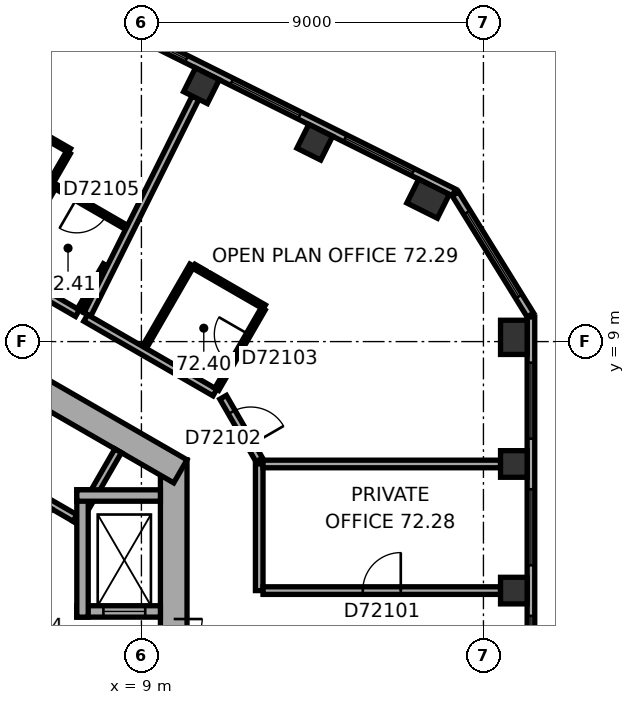
"""IFC4 building model, lengths in metres.
Left out: names, types, materials, properties, quantities, classifications, styles, units other than length and angle.
Written with IfcOpenShell. Run it as: python <this file> out.ifc"""

import sys

from ifc_helpers import new_model, si_unit, direction, frame, frame_2d, origin, origin_2d, place, context, subcontext, project, spatial, rectangle, extrude, element, fill, save


model = new_model("IFC4")
c1 = context("Model", 3, precision=1e-05, world=origin(), true_north=direction((0.0, 1.0)))
c2 = subcontext(c1, "Body", "Model", "MODEL_VIEW")
j1 = project(units=[si_unit("LENGTHUNIT", "METRE"), si_unit("PLANEANGLEUNIT", "RADIAN")], contexts=[c1])
p1 = place(None, origin())
s1 = spatial("IfcSite", under=j1, at=p1, CompositionType="ELEMENT")
p2 = place(p1, origin())
s2 = spatial("IfcBuilding", under=s1, at=p2, CompositionType="ELEMENT")
p3 = place(p2, frame((0.0, 0.0, 293.1)))
s3 = spatial("IfcBuildingStorey", under=s2, at=p3, CompositionType="ELEMENT", Elevation=293.1)
for number, where, z_axis, x_axis in (
    (1, (18.8, 2.448, 0.0), (0.0, 0.0, 1.0), (0.0, 1.0, 0.0)),
    (2, (18.8, 5.78, 0.0), (0.0, 0.0, 1.0), (0.0, 1.0, 0.0)),
):
    element("IfcColumn", number, at=place(p3, frame(where, z_axis=z_axis, x_axis=x_axis)), inside=s3, PredefinedType="COLUMN", context=c2, shape_type="SweptSolid", body=[
        extrude(rectangle(XDim=0.7, YDim=0.7, at=origin_2d()), origin(), (0.0, 0.0, 1.0), 3.7),
    ])
for number, where, z_axis, x_axis in (
    (3, (18.8, 9.112, 0.0), (0.0, 0.0, 1.0), (0.0, 1.0, 0.0)),
    (4, (16.543, 12.759, 0.0), (0.0, 0.0, 1.0), (-0.895, 0.446, 0.0)),
):
    element("IfcColumn", number, at=place(p3, frame(where, z_axis=z_axis, x_axis=x_axis)), inside=s3, PredefinedType="COLUMN", context=c2, shape_type="SweptSolid", body=[
        extrude(rectangle(XDim=0.9, YDim=0.7, at=origin_2d()), origin(), (0.0, 0.0, 1.0), 3.7),
    ])
for number, where, z_axis, x_axis in (
    (5, (13.561, 14.246, 0.0), (0.0, 0.0, 1.0), (-0.895, 0.446, 0.0)),
    (6, (10.58, 15.732, 0.0), (0.0, 0.0, 1.0), (-0.895, 0.446, 0.0)),
):
    element("IfcColumn", number, at=place(p3, frame(where, z_axis=z_axis, x_axis=x_axis)), inside=s3, PredefinedType="COLUMN", context=c2, shape_type="SweptSolid", body=[
        extrude(rectangle(XDim=0.7, YDim=0.7, at=origin_2d()), origin(), (0.0, 0.0, 1.0), 3.7),
    ])
p4 = place(p3, frame((9.85, -5.889, 0.0), z_axis=(0.0, 0.0, 1.0), x_axis=(0.0, 1.0, 0.0)))
e7 = element("IfcWall", 7, at=p4, inside=s3, PredefinedType="SHEAR", context=c2, shape_type="SweptSolid", body=[
    extrude(rectangle(XDim=11.778, YDim=0.7, at=frame_2d((5.889, 0.0))), origin(), (0.0, 0.0, 1.0), 3.7),
])
p5 = place(p4, frame((6.089, 0.0, 0.0)))
e8 = element("IfcOpeningElement", 8, at=p5, cuts=e7, PredefinedType="OPENING", context=c2, shape_type="SweptSolid", body=[
    extrude(rectangle(XDim=1.5, YDim=2.1, at=frame_2d((0.75, 1.05))), frame((0.0, 0.36, 0.0), z_axis=(0.0, -1.0, 0.0), x_axis=(1.0, 0.0, 0.0)), (0.0, 0.0, 1.0), 0.72),
])
p6 = place(p4, frame((2.939, 0.0, 0.0)))
e9 = element("IfcOpeningElement", 9, at=p6, cuts=e7, PredefinedType="OPENING", context=c2, shape_type="SweptSolid", body=[
    extrude(rectangle(XDim=0.9, YDim=2.1, at=frame_2d((0.45, 1.05))), frame((0.0, 0.36, 0.0), z_axis=(0.0, -1.0, 0.0), x_axis=(1.0, 0.0, 0.0)), (0.0, 0.0, 1.0), 0.72),
])
p7 = place(p3, frame((10.025, 5.586, 0.0), z_axis=(0.0, 0.0, 1.0), x_axis=(-0.866026453023, 0.499998182661, 0.0)))
e10 = element("IfcWall", 10, at=p7, inside=s3, PredefinedType="SHEAR", context=c2, shape_type="SweptSolid", body=[
    extrude(rectangle(XDim=11.778, YDim=0.7, at=frame_2d((5.889, 0.0))), origin(), (0.0, 0.0, 1.0), 3.7),
])
p8 = place(p7, frame((5.139, 0.0, 0.0)))
e11 = element("IfcOpeningElement", 11, at=p8, cuts=e10, PredefinedType="OPENING", context=c2, shape_type="SweptSolid", body=[
    extrude(rectangle(XDim=0.9, YDim=2.1, at=frame_2d((0.45, 1.05))), frame((0.0, 0.36, 0.0), z_axis=(0.0, -1.0, 0.0), x_axis=(1.0, 0.0, 0.0)), (0.0, 0.0, 1.0), 0.72),
])
p9 = place(p3, frame((19.25, -8.084, 0.0), z_axis=(0.0, 0.0, 1.0), x_axis=(0.0, 1.0, 0.0)))
e12 = element("IfcWall", 12, at=p9, inside=s3, PredefinedType="STANDARD", context=c2, shape_type="SweptSolid", body=[
    extrude(rectangle(XDim=17.731, YDim=0.2, at=frame_2d((8.866, 0.0))), origin(), (0.0, 0.0, 1.0), 3.7),
])
p10 = place(p9, frame((1.203, 0.0, 0.9)))
e13 = element("IfcOpeningElement", 13, at=p10, cuts=e12, PredefinedType="OPENING", context=c2, shape_type="SweptSolid", body=[
    extrude(rectangle(XDim=2.0, YDim=2.0, at=frame_2d((1.0, 1.0))), frame((0.0, 0.11, 0.0), z_axis=(0.0, -1.0, 0.0), x_axis=(1.0, 0.0, 0.0)), (0.0, 0.0, 1.0), 0.22),
])
p11 = place(p9, frame((4.535, 0.0, 0.9)))
e14 = element("IfcOpeningElement", 14, at=p11, cuts=e12, PredefinedType="OPENING", context=c2, shape_type="SweptSolid", body=[
    extrude(rectangle(XDim=2.0, YDim=2.0, at=frame_2d((1.0, 1.0))), frame((0.0, 0.11, 0.0), z_axis=(0.0, -1.0, 0.0), x_axis=(1.0, 0.0, 0.0)), (0.0, 0.0, 1.0), 0.22),
])
p12 = place(p9, frame((7.866, 0.0, 0.9)))
e15 = element("IfcOpeningElement", 15, at=p12, cuts=e12, PredefinedType="OPENING", context=c2, shape_type="SweptSolid", body=[
    extrude(rectangle(XDim=2.0, YDim=2.0, at=frame_2d((1.0, 1.0))), frame((0.0, 0.11, 0.0), z_axis=(0.0, -1.0, 0.0), x_axis=(1.0, 0.0, 0.0)), (0.0, 0.0, 1.0), 0.22),
])
p13 = place(p9, frame((11.198, 0.0, 0.9)))
e16 = element("IfcOpeningElement", 16, at=p13, cuts=e12, PredefinedType="OPENING", context=c2, shape_type="SweptSolid", body=[
    extrude(rectangle(XDim=2.0, YDim=2.0, at=frame_2d((1.0, 1.0))), frame((0.0, 0.11, 0.0), z_axis=(0.0, -1.0, 0.0), x_axis=(1.0, 0.0, 0.0)), (0.0, 0.0, 1.0), 0.22),
])
p14 = place(p9, frame((14.53, 0.0, 0.9)))
e17 = element("IfcOpeningElement", 17, at=p14, cuts=e12, PredefinedType="OPENING", context=c2, shape_type="SweptSolid", body=[
    extrude(rectangle(XDim=2.0, YDim=2.0, at=frame_2d((1.0, 1.0))), frame((0.0, 0.11, 0.0), z_axis=(0.0, -1.0, 0.0), x_axis=(1.0, 0.0, 0.0)), (0.0, 0.0, 1.0), 0.22),
])
p15 = place(p3, frame((19.235, 9.7, 0.0), z_axis=(0.0, 0.0, 1.0), x_axis=(-0.526233475464, 0.850340125656, 0.0)))
e18 = element("IfcWall", 18, at=p15, inside=s3, PredefinedType="STANDARD", context=c2, shape_type="SweptSolid", body=[
    extrude(rectangle(XDim=3.747, YDim=0.2, at=frame_2d((1.874, 0.0))), origin(), (0.0, 0.0, 1.0), 3.7),
])
p16 = place(p15, frame((0.573, 0.0, 0.9)))
e19 = element("IfcOpeningElement", 19, at=p16, cuts=e18, PredefinedType="OPENING", context=c2, shape_type="SweptSolid", body=[
    extrude(rectangle(XDim=2.6, YDim=2.0, at=frame_2d((1.3, 1.0))), frame((0.0, 0.11, 0.0), z_axis=(0.0, -1.0, 0.0), x_axis=(1.0, 0.0, 0.0)), (0.0, 0.0, 1.0), 0.22),
])
p17 = place(p3, frame((17.223, 12.923, 0.0), z_axis=(0.0, 0.0, 1.0), x_axis=(-0.894930561148, 0.44620543556, 0.0)))
e20 = element("IfcWall", 20, at=p17, inside=s3, PredefinedType="STANDARD", context=c2, shape_type="SweptSolid", body=[
    extrude(rectangle(XDim=17.731, YDim=0.2, at=frame_2d((8.866, 0.0))), origin(), (0.0, 0.0, 1.0), 3.7),
])
p18 = place(p17, frame((1.202, 0.0, 0.9)))
e21 = element("IfcOpeningElement", 21, at=p18, cuts=e20, PredefinedType="OPENING", context=c2, shape_type="SweptSolid", body=[
    extrude(rectangle(XDim=2.0, YDim=2.0, at=frame_2d((1.0, 1.0))), frame((0.0, 0.11, 0.0), z_axis=(0.0, -1.0, 0.0), x_axis=(1.0, 0.0, 0.0)), (0.0, 0.0, 1.0), 0.22),
])
p19 = place(p17, frame((4.533, 0.0, 0.9)))
e22 = element("IfcOpeningElement", 22, at=p19, cuts=e20, PredefinedType="OPENING", context=c2, shape_type="SweptSolid", body=[
    extrude(rectangle(XDim=2.0, YDim=2.0, at=frame_2d((1.0, 1.0))), frame((0.0, 0.11, 0.0), z_axis=(0.0, -1.0, 0.0), x_axis=(1.0, 0.0, 0.0)), (0.0, 0.0, 1.0), 0.22),
])
p20 = place(p17, frame((7.865, 0.0, 0.9)))
e23 = element("IfcOpeningElement", 23, at=p20, cuts=e20, PredefinedType="OPENING", context=c2, shape_type="SweptSolid", body=[
    extrude(rectangle(XDim=2.0, YDim=2.0, at=frame_2d((1.0, 1.0))), frame((0.0, 0.11, 0.0), z_axis=(0.0, -1.0, 0.0), x_axis=(1.0, 0.0, 0.0)), (0.0, 0.0, 1.0), 0.22),
])
p21 = place(p17, frame((11.197, 0.0, 0.9)))
e24 = element("IfcOpeningElement", 24, at=p21, cuts=e20, PredefinedType="OPENING", context=c2, shape_type="SweptSolid", body=[
    extrude(rectangle(XDim=2.0, YDim=2.0, at=frame_2d((1.0, 1.0))), frame((0.0, 0.11, 0.0), z_axis=(0.0, -1.0, 0.0), x_axis=(1.0, 0.0, 0.0)), (0.0, 0.0, 1.0), 0.22),
])
p22 = place(p17, frame((14.528, 0.0, 0.9)))
e25 = element("IfcOpeningElement", 25, at=p22, cuts=e20, PredefinedType="OPENING", context=c2, shape_type="SweptSolid", body=[
    extrude(rectangle(XDim=2.0, YDim=2.0, at=frame_2d((1.0, 1.0))), frame((0.0, 0.11, 0.0), z_axis=(0.0, -1.0, 0.0), x_axis=(1.0, 0.0, 0.0)), (0.0, 0.0, 1.0), 0.22),
])
p23 = place(p3, frame((7.424, 4.259, 0.0), z_axis=(0.0, 0.0, 1.0), x_axis=(-0.866026010844, 0.49999894854, 0.0)))
e26 = element("IfcWall", 26, at=p23, inside=s3, PredefinedType="PARTITIONING", context=c2, shape_type="SweptSolid", body=[
    extrude(rectangle(XDim=8.0, YDim=0.2, at=frame_2d((4.0, 0.0))), origin(), (0.0, 0.0, 1.0), 3.42),
])
p24 = place(p3, frame((7.287, 4.222, 0.0), z_axis=(0.0, 0.0, 1.0), x_axis=(0.499946605688, 0.86605622881, 0.0)))
e27 = element("IfcWall", 27, at=p24, inside=s3, PredefinedType="PARTITIONING", context=c2, shape_type="SweptSolid", body=[
    extrude(rectangle(XDim=2.2, YDim=0.2, at=frame_2d((1.1, 0.0))), origin(), (0.0, 0.0, 1.0), 3.42),
])
p25 = place(p3, frame((7.3, 1.9, 0.0), z_axis=(0.0, 0.0, 1.0), x_axis=(1.0, 0.0, 0.0)))
e28 = element("IfcWall", 28, at=p25, inside=s3, PredefinedType="SHEAR", context=c2, shape_type="SweptSolid", body=[
    extrude(rectangle(XDim=2.2, YDim=0.3, at=frame_2d((1.1, 0.0))), origin(), (0.0, 0.0, 1.0), 3.42),
])
p26 = place(p25, frame((0.7, 0.0, 0.0)))
e29 = element("IfcOpeningElement", 29, at=p26, cuts=e28, PredefinedType="OPENING", context=c2, shape_type="SweptSolid", body=[
    extrude(rectangle(XDim=1.1, YDim=2.1, at=frame_2d((0.55, 1.05))), frame((0.0, 0.16, 0.0), z_axis=(0.0, -1.0, 0.0), x_axis=(1.0, 0.0, 0.0)), (0.0, 0.0, 1.0), 0.32),
])
p27 = place(p3, frame((7.45, 1.75, 0.0), z_axis=(0.0, 0.0, 1.0), x_axis=(0.0, 1.0, 0.0)))
e30 = element("IfcWall", 30, at=p27, inside=s3, PredefinedType="SHEAR", context=c2, shape_type="SweptSolid", body=[
    extrude(rectangle(XDim=3.35, YDim=0.3, at=frame_2d((1.675, 0.0))), origin(), (0.0, 0.0, 1.0), 3.42),
])
p28 = place(p3, frame((7.3, 4.95, 0.0), z_axis=(0.0, 0.0, 1.0), x_axis=(1.0, 0.0, 0.0)))
e31 = element("IfcWall", 31, at=p28, inside=s3, PredefinedType="SHEAR", context=c2, shape_type="SweptSolid", body=[
    extrude(rectangle(XDim=2.2, YDim=0.3, at=frame_2d((1.1, 0.0))), origin(), (0.0, 0.0, 1.0), 3.42),
])
p29 = place(p3, frame((4.215, 15.695, 0.0), z_axis=(0.0, 0.0, 1.0), x_axis=(0.865989591418, -0.50006202371, 0.0)))
e32 = element("IfcWall", 32, at=p29, inside=s3, PredefinedType="PARTITIONING", context=c2, shape_type="SweptSolid", body=[
    extrude(rectangle(XDim=3.34, YDim=0.12, at=frame_2d((1.67, 0.0))), origin(), (0.0, 0.0, 1.0), 3.42),
])
p30 = place(p3, frame((5.461, 10.934, 0.0), z_axis=(0.0, 0.0, 1.0), x_axis=(0.500004234368, 0.866022959057, 0.0)))
e33 = element("IfcWall", 33, at=p30, inside=s3, PredefinedType="PARTITIONING", context=c2, shape_type="SweptSolid", body=[
    extrude(rectangle(XDim=2.5, YDim=0.12, at=frame_2d((1.25, 0.0))), origin(), (0.0, 0.0, 1.0), 3.42),
])
p31 = place(p3, frame((6.763, 13.069, 0.0), z_axis=(0.0, 0.0, 1.0), x_axis=(0.866019511163, -0.500010206181, 0.0)))
e34 = element("IfcWall", 34, at=p31, inside=s3, PredefinedType="PARTITIONING", context=c2, shape_type="SweptSolid", body=[
    extrude(rectangle(XDim=2.13, YDim=0.12, at=frame_2d((1.065, 0.0))), origin(), (0.0, 0.0, 1.0), 3.42),
])
p32 = place(p31, frame((0.615, 0.0, 0.0)))
e35 = element("IfcOpeningElement", 35, at=p32, cuts=e34, PredefinedType="OPENING", context=c2, shape_type="SweptSolid", body=[
    extrude(rectangle(XDim=0.9, YDim=2.1, at=frame_2d((0.45, 1.05))), frame((0.0, 0.07, 0.0), z_axis=(0.0, -1.0, 0.0), x_axis=(1.0, 0.0, 0.0)), (0.0, 0.0, 1.0), 0.14),
])
p33 = place(p3, frame((7.077, 13.973, 0.0), z_axis=(0.0, 0.0, 1.0), x_axis=(-0.499955923987, -0.866050849587, 0.0)))
e36 = element("IfcWall", 36, at=p33, inside=s3, PredefinedType="PARTITIONING", context=c2, shape_type="SweptSolid", body=[
    extrude(rectangle(XDim=3.44, YDim=0.12, at=frame_2d((1.72, 0.0))), origin(), (0.0, 0.0, 1.0), 3.42),
])
p34 = place(p3, frame((7.317, 9.748, 0.0), z_axis=(0.0, 0.0, 1.0), x_axis=(-0.866028486751, 0.499994660107, 0.0)))
e37 = element("IfcWall", 37, at=p34, inside=s3, PredefinedType="PARTITIONING", context=c2, shape_type="SweptSolid", body=[
    extrude(rectangle(XDim=2.2, YDim=0.2, at=frame_2d((1.1, 0.0))), origin(), (0.0, 0.0, 1.0), 3.42),
])
p35 = place(p3, frame((8.051, 11.019, 0.0), z_axis=(0.0, 0.0, 1.0), x_axis=(-0.500093228334, -0.86597157169, 0.0)))
e38 = element("IfcWall", 38, at=p35, inside=s3, PredefinedType="PARTITIONING", context=c2, shape_type="SweptSolid", body=[
    extrude(rectangle(XDim=1.368, YDim=0.12, at=frame_2d((0.684, 0.0))), origin(), (0.0, 0.0, 1.0), 3.42),
])
p36 = place(p3, frame((9.078, 8.846, 0.0), z_axis=(0.0, 0.0, 1.0), x_axis=(0.500004234368, 0.866022959057, 0.0)))
e39 = element("IfcWall", 39, at=p36, inside=s3, PredefinedType="PARTITIONING", context=c2, shape_type="SweptSolid", body=[
    extrude(rectangle(XDim=2.5, YDim=0.12, at=frame_2d((1.25, 0.0))), origin(), (0.0, 0.0, 1.0), 3.42),
])
p37 = place(p3, frame((10.38, 10.981, 0.0), z_axis=(0.0, 0.0, 1.0), x_axis=(0.86600889856, -0.500028586798, 0.0)))
e40 = element("IfcWall", 40, at=p37, inside=s3, PredefinedType="PARTITIONING", context=c2, shape_type="SweptSolid", body=[
    extrude(rectangle(XDim=2.14, YDim=0.12, at=frame_2d((1.07, 0.0))), origin(), (0.0, 0.0, 1.0), 3.42),
])
p38 = place(p3, frame((10.423, 15.419, 0.0), z_axis=(0.0, 0.0, 1.0), x_axis=(-0.446202606517, -0.894931971681, 0.0)))
e41 = element("IfcWall", 41, at=p38, inside=s3, PredefinedType="PARTITIONING", context=c2, shape_type="SweptSolid", body=[
    extrude(rectangle(XDim=6.377, YDim=0.2, at=frame_2d((3.188, 0.0))), origin(), (0.0, 0.0, 1.0), 2.87),
])
p39 = place(p3, frame((10.934, 7.659, 0.0), z_axis=(0.0, 0.0, 1.0), x_axis=(-0.866034411203, 0.499984398369, 0.0)))
e42 = element("IfcWall", 42, at=p39, inside=s3, PredefinedType="PARTITIONING", context=c2, shape_type="SweptSolid", body=[
    extrude(rectangle(XDim=3.927, YDim=0.2, at=frame_2d((1.963, 0.0))), origin(), (0.0, 0.0, 1.0), 3.42),
])
p40 = place(p3, frame((12.1, 2.448, 0.0), z_axis=(0.0, 0.0, 1.0), x_axis=(0.0, 1.0, 0.0)))
e43 = element("IfcWall", 43, at=p40, inside=s3, PredefinedType="PARTITIONING", context=c2, shape_type="SweptSolid", body=[
    extrude(rectangle(XDim=3.332, YDim=0.2, at=frame_2d((1.666, 0.0))), origin(), (0.0, 0.0, 1.0), 3.42),
])
p41 = place(p3, frame((12.1, 5.889, 0.0), z_axis=(0.0, 0.0, 1.0), x_axis=(-0.500063520245, 0.865988727248, 0.0)))
e44 = element("IfcWall", 44, at=p41, inside=s3, PredefinedType="PARTITIONING", context=c2, shape_type="SweptSolid", body=[
    extrude(rectangle(XDim=1.9, YDim=0.2, at=frame_2d((0.95, 0.0))), origin(), (0.0, 0.0, 1.0), 3.42),
])
p42 = place(p41, frame((0.45, 0.0, 0.0)))
e45 = element("IfcOpeningElement", 45, at=p42, cuts=e44, PredefinedType="OPENING", context=c2, shape_type="SweptSolid", body=[
    extrude(rectangle(XDim=1.0, YDim=2.1, at=frame_2d((0.5, 1.05))), frame((0.0, 0.11, 0.0), z_axis=(0.0, -1.0, 0.0), x_axis=(1.0, 0.0, 0.0)), (0.0, 0.0, 1.0), 0.22),
])
p43 = place(p3, frame((12.204, 9.859, 0.0), z_axis=(0.0, 0.0, 1.0), x_axis=(-0.500077547548, -0.865980627057, 0.0)))
e46 = element("IfcWall", 46, at=p43, inside=s3, PredefinedType="PARTITIONING", context=c2, shape_type="SweptSolid", body=[
    extrude(rectangle(XDim=2.44, YDim=0.12, at=frame_2d((1.22, 0.0))), origin(), (0.0, 0.0, 1.0), 3.42),
])
p44 = place(p43, frame((0.77, 0.0, 0.0)))
e47 = element("IfcOpeningElement", 47, at=p44, cuts=e46, PredefinedType="OPENING", context=c2, shape_type="SweptSolid", body=[
    extrude(rectangle(XDim=0.9, YDim=2.1, at=frame_2d((0.45, 1.05))), frame((0.0, 0.07, 0.0), z_axis=(0.0, -1.0, 0.0), x_axis=(1.0, 0.0, 0.0)), (0.0, 0.0, 1.0), 0.14),
])
p45 = place(p3, frame((18.45, 2.448, 0.0), z_axis=(0.0, 0.0, 1.0), x_axis=(-1.0, 0.0, 0.0)))
e48 = element("IfcWall", 48, at=p45, inside=s3, PredefinedType="PARTITIONING", context=c2, shape_type="SweptSolid", body=[
    extrude(rectangle(XDim=6.25, YDim=0.2, at=frame_2d((3.125, 0.0))), origin(), (0.0, 0.0, 1.0), 3.42),
])
p46 = place(p45, frame((2.625, 0.0, 0.0)))
e49 = element("IfcOpeningElement", 49, at=p46, cuts=e48, PredefinedType="OPENING", context=c2, shape_type="SweptSolid", body=[
    extrude(rectangle(XDim=1.0, YDim=2.1, at=frame_2d((0.5, 1.05))), frame((0.0, 0.11, 0.0), z_axis=(0.0, -1.0, 0.0), x_axis=(1.0, 0.0, 0.0)), (0.0, 0.0, 1.0), 0.22),
])
p47 = place(p3, frame((18.45, 5.78, 0.0), z_axis=(0.0, 0.0, 1.0), x_axis=(-1.0, 0.0, 0.0)))
e50 = element("IfcWall", 50, at=p47, inside=s3, PredefinedType="PARTITIONING", context=c2, shape_type="SweptSolid", body=[
    extrude(rectangle(XDim=6.25, YDim=0.2, at=frame_2d((3.125, 0.0))), origin(), (0.0, 0.0, 1.0), 3.42),
])
p48 = place(p12, origin())
e51 = element("IfcWindow", 51, at=p48, inside=s3, PartitioningType="SINGLE_PANEL", PredefinedType="WINDOW", context=c2, shape_type="SweptSolid", body=[
    extrude(rectangle(XDim=2.0, YDim=2.0, at=frame_2d((1.0, 1.0))), frame((0.0, 0.03, 0.0), z_axis=(0.0, -1.0, 0.0), x_axis=(1.0, 0.0, 0.0)), (0.0, 0.0, 1.0), 0.06),
])
fill(e15, e51)
p49 = place(p13, origin())
e52 = element("IfcWindow", 52, at=p49, inside=s3, PartitioningType="SINGLE_PANEL", PredefinedType="WINDOW", context=c2, shape_type="SweptSolid", body=[
    extrude(rectangle(XDim=2.0, YDim=2.0, at=frame_2d((1.0, 1.0))), frame((0.0, 0.03, 0.0), z_axis=(0.0, -1.0, 0.0), x_axis=(1.0, 0.0, 0.0)), (0.0, 0.0, 1.0), 0.06),
])
fill(e16, e52)
p50 = place(p14, origin())
e53 = element("IfcWindow", 53, at=p50, inside=s3, PartitioningType="SINGLE_PANEL", PredefinedType="WINDOW", context=c2, shape_type="SweptSolid", body=[
    extrude(rectangle(XDim=2.0, YDim=2.0, at=frame_2d((1.0, 1.0))), frame((0.0, 0.03, 0.0), z_axis=(0.0, -1.0, 0.0), x_axis=(1.0, 0.0, 0.0)), (0.0, 0.0, 1.0), 0.06),
])
fill(e17, e53)
p51 = place(p16, origin())
e54 = element("IfcWindow", 54, at=p51, inside=s3, PartitioningType="SINGLE_PANEL", PredefinedType="WINDOW", context=c2, shape_type="SweptSolid", body=[
    extrude(rectangle(XDim=2.6, YDim=2.0, at=frame_2d((1.3, 1.0))), frame((0.0, 0.03, 0.0), z_axis=(0.0, -1.0, 0.0), x_axis=(1.0, 0.0, 0.0)), (0.0, 0.0, 1.0), 0.06),
])
fill(e19, e54)
p52 = place(p18, origin())
e55 = element("IfcWindow", 55, at=p52, inside=s3, PartitioningType="SINGLE_PANEL", PredefinedType="WINDOW", context=c2, shape_type="SweptSolid", body=[
    extrude(rectangle(XDim=2.0, YDim=2.0, at=frame_2d((1.0, 1.0))), frame((0.0, 0.03, 0.0), z_axis=(0.0, -1.0, 0.0), x_axis=(1.0, 0.0, 0.0)), (0.0, 0.0, 1.0), 0.06),
])
fill(e21, e55)
p53 = place(p19, origin())
e56 = element("IfcWindow", 56, at=p53, inside=s3, PartitioningType="SINGLE_PANEL", PredefinedType="WINDOW", context=c2, shape_type="SweptSolid", body=[
    extrude(rectangle(XDim=2.0, YDim=2.0, at=frame_2d((1.0, 1.0))), frame((0.0, 0.03, 0.0), z_axis=(0.0, -1.0, 0.0), x_axis=(1.0, 0.0, 0.0)), (0.0, 0.0, 1.0), 0.06),
])
fill(e22, e56)
p54 = place(p20, origin())
e57 = element("IfcWindow", 57, at=p54, inside=s3, PartitioningType="SINGLE_PANEL", PredefinedType="WINDOW", context=c2, shape_type="SweptSolid", body=[
    extrude(rectangle(XDim=2.0, YDim=2.0, at=frame_2d((1.0, 1.0))), frame((0.0, 0.03, 0.0), z_axis=(0.0, -1.0, 0.0), x_axis=(1.0, 0.0, 0.0)), (0.0, 0.0, 1.0), 0.06),
])
fill(e23, e57)
p55 = place(p5, origin())
e58 = element("IfcDoor", 58, at=p55, inside=s3, OperationType="DOUBLE_DOOR_SINGLE_SWING", PredefinedType="DOOR", context=c2, shape_type="SweptSolid", body=[
    extrude(rectangle(XDim=1.5, YDim=2.1, at=frame_2d((0.75, 1.05))), frame((0.0, 0.025, 0.0), z_axis=(0.0, -1.0, 0.0), x_axis=(1.0, 0.0, 0.0)), (0.0, 0.0, 1.0), 0.05),
])
fill(e8, e58)
p56 = place(p26, origin())
e59 = element("IfcDoor", 59, at=p56, inside=s3, OperationType="DOUBLE_DOOR_SLIDING", PredefinedType="DOOR", context=c2, shape_type="SweptSolid", body=[
    extrude(rectangle(XDim=1.1, YDim=2.1, at=frame_2d((0.55, 1.05))), frame((0.0, 0.025, 0.0), z_axis=(0.0, -1.0, 0.0), x_axis=(1.0, 0.0, 0.0)), (0.0, 0.0, 1.0), 0.05),
])
fill(e29, e59)
p57 = place(p46, origin())
e60 = element("IfcDoor", 60, at=p57, inside=s3, OperationType="SINGLE_SWING_LEFT", PredefinedType="DOOR", context=c2, shape_type="SweptSolid", body=[
    extrude(rectangle(XDim=1.0, YDim=2.1, at=frame_2d((0.5, 1.05))), frame((0.0, 0.025, 0.0), z_axis=(0.0, -1.0, 0.0), x_axis=(1.0, 0.0, 0.0)), (0.0, 0.0, 1.0), 0.05),
])
fill(e49, e60)
p58 = place(p42, origin())
e61 = element("IfcDoor", 61, at=p58, inside=s3, OperationType="SINGLE_SWING_LEFT", PredefinedType="DOOR", context=c2, shape_type="SweptSolid", body=[
    extrude(rectangle(XDim=1.0, YDim=2.1, at=frame_2d((0.5, 1.05))), frame((0.0, 0.025, 0.0), z_axis=(0.0, -1.0, 0.0), x_axis=(1.0, 0.0, 0.0)), (0.0, 0.0, 1.0), 0.05),
])
fill(e45, e61)
p59 = place(p44, origin())
e62 = element("IfcDoor", 62, at=p59, inside=s3, OperationType="SINGLE_SWING_LEFT", PredefinedType="DOOR", context=c2, shape_type="SweptSolid", body=[
    extrude(rectangle(XDim=0.9, YDim=2.1, at=frame_2d((0.45, 1.05))), frame((0.0, 0.025, 0.0), z_axis=(0.0, -1.0, 0.0), x_axis=(1.0, 0.0, 0.0)), (0.0, 0.0, 1.0), 0.05),
])
fill(e47, e62)
p60 = place(p32, origin())
e63 = element("IfcDoor", 63, at=p60, inside=s3, OperationType="SINGLE_SWING_LEFT", PredefinedType="DOOR", context=c2, shape_type="SweptSolid", body=[
    extrude(rectangle(XDim=0.9, YDim=2.1, at=frame_2d((0.45, 1.05))), frame((0.0, 0.025, 0.0), z_axis=(0.0, -1.0, 0.0), x_axis=(1.0, 0.0, 0.0)), (0.0, 0.0, 1.0), 0.05),
])
fill(e35, e63)
save(model, sys.argv[1])
